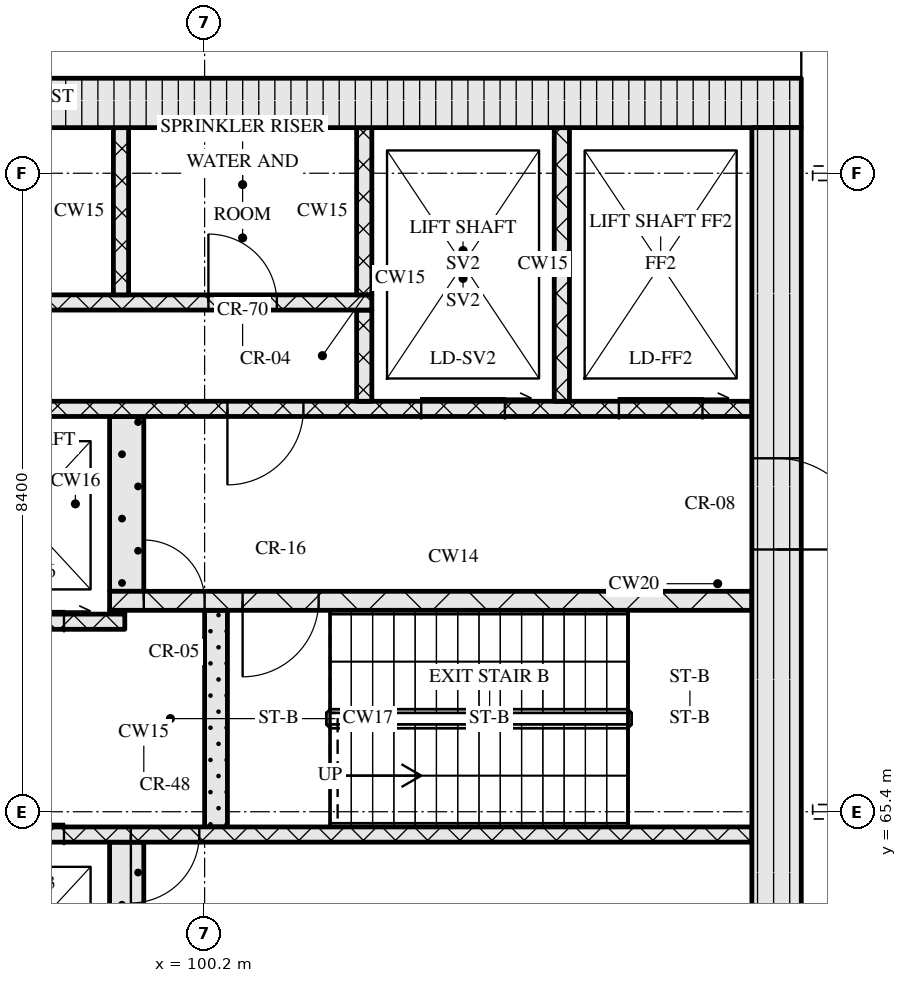
"""IFC4 building model, lengths in metres.
Left out: names, types, materials, properties, quantities, classifications, styles, units other than length and angle.
Written with IfcOpenShell. Run it as: python <this file> out.ifc"""

import sys

from ifc_helpers import new_model, si_unit, direction, frame, frame_2d, origin, place, context, subcontext, project, spatial, rectangle, extrude, element, fill, save


model = new_model("IFC4")
c1 = context("Model", 3, precision=1e-05, world=origin(), true_north=direction((0.0, 1.0)))
c2 = subcontext(c1, "Body", "Model", "MODEL_VIEW")
j1 = project(units=[si_unit("LENGTHUNIT", "METRE"), si_unit("PLANEANGLEUNIT", "RADIAN")], contexts=[c1])
p1 = place(None, origin())
s1 = spatial("IfcSite", under=j1, at=p1, CompositionType="ELEMENT")
p2 = place(p1, origin())
s2 = spatial("IfcBuilding", under=s1, at=p2, CompositionType="ELEMENT")
p3 = place(p2, frame((0.0, 0.0, 194.25)))
s3 = spatial("IfcBuildingStorey", under=s2, at=p3, CompositionType="ELEMENT", Elevation=194.25)
p4 = place(p3, frame((67.15, 74.725, 0.0), z_axis=(0.0, 0.0, 1.0), x_axis=(1.0, 0.0, 0.0)))
e1 = element("IfcWall", 1, at=p4, inside=s3, PredefinedType="SOLIDWALL", context=c2, shape_type="SweptSolid", body=[
    extrude(rectangle(XDim=40.9, YDim=0.65, at=frame_2d((20.45, 0.0))), origin(), (0.0, 0.0, 1.0), 10.97),
])
p5 = place(p3, frame((107.725, 62.4, 0.0), z_axis=(0.0, 0.0, 1.0), x_axis=(0.0, 1.0, 0.0)))
e2 = element("IfcWall", 2, at=p5, inside=s3, PredefinedType="SOLIDWALL", context=c2, shape_type="SweptSolid", body=[
    extrude(rectangle(XDim=12.0, YDim=0.65, at=frame_2d((6.0, 0.0))), origin(), (0.0, 0.0, 1.0), 10.97),
])
p6 = place(p5, frame((6.45, 0.0, 0.0)))
e3 = element("IfcOpeningElement", 3, at=p6, cuts=e2, PredefinedType="OPENING", context=c2, shape_type="SweptSolid", body=[
    extrude(rectangle(XDim=1.2, YDim=2.1, at=frame_2d((0.6, 1.05))), frame((0.0, 0.335, 0.0), z_axis=(0.0, -1.0, 0.0), x_axis=(1.0, 0.0, 0.0)), (0.0, 0.0, 1.0), 0.67),
])
p7 = place(p3, frame((99.175, 62.4, 0.0), z_axis=(0.0, 0.0, 1.0), x_axis=(0.0, 1.0, 0.0)))
e4 = element("IfcWall", 4, at=p7, inside=s3, PredefinedType="SOLIDWALL", context=c2, shape_type="SweptSolid", body=[
    extrude(rectangle(XDim=2.6, YDim=0.45, at=frame_2d((1.3, 0.0))), origin(), (0.0, 0.0, 1.0), 10.97),
])
p8 = place(p3, frame((91.4, 65.1, 0.0), z_axis=(0.0, 0.0, 1.0), x_axis=(1.0, 0.0, 0.0)))
e5 = element("IfcWall", 5, at=p8, inside=s3, PredefinedType="SOLIDWALL", context=c2, shape_type="SweptSolid", body=[
    extrude(rectangle(XDim=16.0, YDim=0.2, at=frame_2d((8.0, 0.0))), origin(), (0.0, 0.0, 1.0), 10.97),
])
p9 = place(p8, frame((0.85, 0.0, 0.0)))
e6 = element("IfcOpeningElement", 6, at=p9, cuts=e5, PredefinedType="OPENING", context=c2, shape_type="SweptSolid", body=[
    extrude(rectangle(XDim=1.1, YDim=2.1, at=frame_2d((0.55, 1.05))), frame((0.0, 0.11, 0.0), z_axis=(0.0, -1.0, 0.0), x_axis=(1.0, 0.0, 0.0)), (0.0, 0.0, 1.0), 0.22),
])
p10 = place(p8, frame((3.35, 0.0, 0.0)))
e7 = element("IfcOpeningElement", 7, at=p10, cuts=e5, PredefinedType="OPENING", context=c2, shape_type="SweptSolid", body=[
    extrude(rectangle(XDim=1.1, YDim=2.1, at=frame_2d((0.55, 1.05))), frame((0.0, 0.11, 0.0), z_axis=(0.0, -1.0, 0.0), x_axis=(1.0, 0.0, 0.0)), (0.0, 0.0, 1.0), 0.22),
])
p11 = place(p8, frame((5.85, 0.0, 0.0)))
e8 = element("IfcOpeningElement", 8, at=p11, cuts=e5, PredefinedType="OPENING", context=c2, shape_type="SweptSolid", body=[
    extrude(rectangle(XDim=1.1, YDim=2.1, at=frame_2d((0.55, 1.05))), frame((0.0, 0.11, 0.0), z_axis=(0.0, -1.0, 0.0), x_axis=(1.0, 0.0, 0.0)), (0.0, 0.0, 1.0), 0.22),
])
p12 = place(p8, frame((7.83, 0.0, 0.0)))
e9 = element("IfcOpeningElement", 9, at=p12, cuts=e5, PredefinedType="OPENING", context=c2, shape_type="SweptSolid", body=[
    extrude(rectangle(XDim=0.9, YDim=2.1, at=frame_2d((0.45, 1.05))), frame((0.0, 0.11, 0.0), z_axis=(0.0, -1.0, 0.0), x_axis=(1.0, 0.0, 0.0)), (0.0, 0.0, 1.0), 0.22),
])
p13 = place(p3, frame((100.35, 65.2, 0.0), z_axis=(0.0, 0.0, 1.0), x_axis=(0.0, 1.0, 0.0)))
e10 = element("IfcWall", 10, at=p13, inside=s3, PredefinedType="SOLIDWALL", context=c2, shape_type="SweptSolid", body=[
    extrude(rectangle(XDim=2.85, YDim=0.3, at=frame_2d((1.425, 0.0))), origin(), (0.0, 0.0, 1.0), 10.97),
])
p14 = place(p3, frame((76.05, 67.9, 0.0), z_axis=(0.0, 0.0, 1.0), x_axis=(1.0, 0.0, 0.0)))
e11 = element("IfcWall", 11, at=p14, inside=s3, PredefinedType="SOLIDWALL", context=c2, shape_type="SweptSolid", body=[
    extrude(rectangle(XDim=23.1, YDim=0.2, at=frame_2d((11.55, 0.0))), origin(), (0.0, 0.0, 1.0), 10.97),
])
p15 = place(p14, frame((0.75, 0.0, 0.0)))
e12 = element("IfcOpeningElement", 12, at=p15, cuts=e11, PredefinedType="OPENING", context=c2, shape_type="SweptSolid", body=[
    extrude(rectangle(XDim=0.9, YDim=2.1, at=frame_2d((0.45, 1.05))), frame((0.0, 0.11, 0.0), z_axis=(0.0, -1.0, 0.0), x_axis=(1.0, 0.0, 0.0)), (0.0, 0.0, 1.0), 0.22),
])
p16 = place(p14, frame((3.32, 0.0, 0.0)))
e13 = element("IfcOpeningElement", 13, at=p16, cuts=e11, PredefinedType="OPENING", context=c2, shape_type="SweptSolid", body=[
    extrude(rectangle(XDim=0.9, YDim=2.1, at=frame_2d((0.45, 1.05))), frame((0.0, 0.11, 0.0), z_axis=(0.0, -1.0, 0.0), x_axis=(1.0, 0.0, 0.0)), (0.0, 0.0, 1.0), 0.22),
])
p17 = place(p14, frame((5.77, 0.0, 0.0)))
e14 = element("IfcOpeningElement", 14, at=p17, cuts=e11, PredefinedType="OPENING", context=c2, shape_type="SweptSolid", body=[
    extrude(rectangle(XDim=0.9, YDim=2.1, at=frame_2d((0.45, 1.05))), frame((0.0, 0.11, 0.0), z_axis=(0.0, -1.0, 0.0), x_axis=(1.0, 0.0, 0.0)), (0.0, 0.0, 1.0), 0.22),
])
p18 = place(p14, frame((8.45, 0.0, 0.0)))
e15 = element("IfcOpeningElement", 15, at=p18, cuts=e11, PredefinedType="OPENING", context=c2, shape_type="SweptSolid", body=[
    extrude(rectangle(XDim=0.9, YDim=2.1, at=frame_2d((0.45, 1.05))), frame((0.0, 0.11, 0.0), z_axis=(0.0, -1.0, 0.0), x_axis=(1.0, 0.0, 0.0)), (0.0, 0.0, 1.0), 0.22),
])
p19 = place(p14, frame((10.91, 0.0, 0.0)))
e16 = element("IfcOpeningElement", 16, at=p19, cuts=e11, PredefinedType="OPENING", context=c2, shape_type="SweptSolid", body=[
    extrude(rectangle(XDim=0.9, YDim=2.1, at=frame_2d((0.45, 1.05))), frame((0.0, 0.11, 0.0), z_axis=(0.0, -1.0, 0.0), x_axis=(1.0, 0.0, 0.0)), (0.0, 0.0, 1.0), 0.22),
])
p20 = place(p14, frame((13.55, 0.0, 0.0)))
e17 = element("IfcOpeningElement", 17, at=p20, cuts=e11, PredefinedType="OPENING", context=c2, shape_type="SweptSolid", body=[
    extrude(rectangle(XDim=1.0, YDim=2.1, at=frame_2d((0.5, 1.05))), frame((0.0, 0.11, 0.0), z_axis=(0.0, -1.0, 0.0), x_axis=(1.0, 0.0, 0.0)), (0.0, 0.0, 1.0), 0.22),
])
p21 = place(p14, frame((16.2, 0.0, 0.0)))
e18 = element("IfcOpeningElement", 18, at=p21, cuts=e11, PredefinedType="OPENING", context=c2, shape_type="SweptSolid", body=[
    extrude(rectangle(XDim=1.1, YDim=2.1, at=frame_2d((0.55, 1.05))), frame((0.0, 0.11, 0.0), z_axis=(0.0, -1.0, 0.0), x_axis=(1.0, 0.0, 0.0)), (0.0, 0.0, 1.0), 0.22),
])
p22 = place(p14, frame((18.7, 0.0, 0.0)))
e19 = element("IfcOpeningElement", 19, at=p22, cuts=e11, PredefinedType="OPENING", context=c2, shape_type="SweptSolid", body=[
    extrude(rectangle(XDim=1.1, YDim=2.1, at=frame_2d((0.55, 1.05))), frame((0.0, 0.11, 0.0), z_axis=(0.0, -1.0, 0.0), x_axis=(1.0, 0.0, 0.0)), (0.0, 0.0, 1.0), 0.22),
])
p23 = place(p14, frame((21.2, 0.0, 0.0)))
e20 = element("IfcOpeningElement", 20, at=p23, cuts=e11, PredefinedType="OPENING", context=c2, shape_type="SweptSolid", body=[
    extrude(rectangle(XDim=1.1, YDim=2.1, at=frame_2d((0.55, 1.05))), frame((0.0, 0.11, 0.0), z_axis=(0.0, -1.0, 0.0), x_axis=(1.0, 0.0, 0.0)), (0.0, 0.0, 1.0), 0.22),
])
p24 = place(p3, frame((98.95, 68.025, 0.0), z_axis=(0.0, 0.0, 1.0), x_axis=(1.0, 0.0, 0.0)))
e21 = element("IfcWall", 21, at=p24, inside=s3, PredefinedType="SOLIDWALL", context=c2, shape_type="SweptSolid", body=[
    extrude(rectangle(XDim=0.2, YDim=0.05, at=frame_2d((0.1, 0.0))), origin(), (0.0, 0.0, 1.0), 10.97),
])
p25 = place(p3, frame((98.95, 68.175, 0.0), z_axis=(0.0, 0.0, 1.0), x_axis=(1.0, 0.0, 0.0)))
e22 = element("IfcWall", 22, at=p25, inside=s3, PredefinedType="SOLIDWALL", context=c2, shape_type="SweptSolid", body=[
    extrude(rectangle(XDim=8.45, YDim=0.25, at=frame_2d((4.225, 0.0))), origin(), (0.0, 0.0, 1.0), 10.97),
])
p26 = place(p25, frame((0.45, 0.0, 0.0)))
e23 = element("IfcOpeningElement", 23, at=p26, cuts=e22, PredefinedType="OPENING", context=c2, shape_type="SweptSolid", body=[
    extrude(rectangle(XDim=0.8, YDim=2.1, at=frame_2d((0.4, 1.05))), frame((0.0, 0.135, 0.0), z_axis=(0.0, -1.0, 0.0), x_axis=(1.0, 0.0, 0.0)), (0.0, 0.0, 1.0), 0.27),
])
p27 = place(p25, frame((1.75, 0.0, 0.0)))
e24 = element("IfcOpeningElement", 24, at=p27, cuts=e22, PredefinedType="OPENING", context=c2, shape_type="SweptSolid", body=[
    extrude(rectangle(XDim=1.0, YDim=2.1, at=frame_2d((0.5, 1.05))), frame((0.0, 0.135, 0.0), z_axis=(0.0, -1.0, 0.0), x_axis=(1.0, 0.0, 0.0)), (0.0, 0.0, 1.0), 0.27),
])
p28 = place(p3, frame((99.175, 68.3, 0.0), z_axis=(0.0, 0.0, 1.0), x_axis=(0.0, 1.0, 0.0)))
e25 = element("IfcWall", 25, at=p28, inside=s3, PredefinedType="SOLIDWALL", context=c2, shape_type="SweptSolid", body=[
    extrude(rectangle(XDim=2.3, YDim=0.45, at=frame_2d((1.15, 0.0))), origin(), (0.0, 0.0, 1.0), 10.97),
])
p29 = place(p3, frame((67.8, 70.7, 0.0), z_axis=(0.0, 0.0, 1.0), x_axis=(1.0, 0.0, 0.0)))
e26 = element("IfcWall", 26, at=p29, inside=s3, PredefinedType="SOLIDWALL", context=c2, shape_type="SweptSolid", body=[
    extrude(rectangle(XDim=39.6, YDim=0.2, at=frame_2d((19.8, 0.0))), origin(), (0.0, 0.0, 1.0), 10.97),
])
p30 = place(p29, frame((0.65, 0.0, 0.0)))
e27 = element("IfcOpeningElement", 27, at=p30, cuts=e26, PredefinedType="OPENING", context=c2, shape_type="SweptSolid", body=[
    extrude(rectangle(XDim=1.1, YDim=2.1, at=frame_2d((0.55, 1.05))), frame((0.0, 0.11, 0.0), z_axis=(0.0, -1.0, 0.0), x_axis=(1.0, 0.0, 0.0)), (0.0, 0.0, 1.0), 0.22),
])
p31 = place(p29, frame((3.25, 0.0, 0.0)))
e28 = element("IfcOpeningElement", 28, at=p31, cuts=e26, PredefinedType="OPENING", context=c2, shape_type="SweptSolid", body=[
    extrude(rectangle(XDim=1.1, YDim=2.1, at=frame_2d((0.55, 1.05))), frame((0.0, 0.11, 0.0), z_axis=(0.0, -1.0, 0.0), x_axis=(1.0, 0.0, 0.0)), (0.0, 0.0, 1.0), 0.22),
])
p32 = place(p29, frame((5.9, 0.0, 0.0)))
e29 = element("IfcOpeningElement", 29, at=p32, cuts=e26, PredefinedType="OPENING", context=c2, shape_type="SweptSolid", body=[
    extrude(rectangle(XDim=1.0, YDim=2.1, at=frame_2d((0.5, 1.05))), frame((0.0, 0.11, 0.0), z_axis=(0.0, -1.0, 0.0), x_axis=(1.0, 0.0, 0.0)), (0.0, 0.0, 1.0), 0.22),
])
p33 = place(p29, frame((21.7, 0.0, 0.0)))
e30 = element("IfcOpeningElement", 30, at=p33, cuts=e26, PredefinedType="OPENING", context=c2, shape_type="SweptSolid", body=[
    extrude(rectangle(XDim=1.0, YDim=2.1, at=frame_2d((0.5, 1.05))), frame((0.0, 0.11, 0.0), z_axis=(0.0, -1.0, 0.0), x_axis=(1.0, 0.0, 0.0)), (0.0, 0.0, 1.0), 0.22),
])
p34 = place(p29, frame((32.7, 0.0, 0.0)))
e31 = element("IfcOpeningElement", 31, at=p34, cuts=e26, PredefinedType="OPENING", context=c2, shape_type="SweptSolid", body=[
    extrude(rectangle(XDim=1.0, YDim=2.1, at=frame_2d((0.5, 1.05))), frame((0.0, 0.11, 0.0), z_axis=(0.0, -1.0, 0.0), x_axis=(1.0, 0.0, 0.0)), (0.0, 0.0, 1.0), 0.22),
])
p35 = place(p29, frame((35.25, 0.0, 0.0)))
e32 = element("IfcOpeningElement", 32, at=p35, cuts=e26, PredefinedType="OPENING", context=c2, shape_type="SweptSolid", body=[
    extrude(rectangle(XDim=1.1, YDim=2.1, at=frame_2d((0.55, 1.05))), frame((0.0, 0.11, 0.0), z_axis=(0.0, -1.0, 0.0), x_axis=(1.0, 0.0, 0.0)), (0.0, 0.0, 1.0), 0.22),
])
p36 = place(p29, frame((37.85, 0.0, 0.0)))
e33 = element("IfcOpeningElement", 33, at=p36, cuts=e26, PredefinedType="OPENING", context=c2, shape_type="SweptSolid", body=[
    extrude(rectangle(XDim=1.1, YDim=2.1, at=frame_2d((0.55, 1.05))), frame((0.0, 0.11, 0.0), z_axis=(0.0, -1.0, 0.0), x_axis=(1.0, 0.0, 0.0)), (0.0, 0.0, 1.0), 0.22),
])
p37 = place(p3, frame((102.3, 70.8, 0.0), z_axis=(0.0, 0.0, 1.0), x_axis=(0.0, 1.0, 0.0)))
e34 = element("IfcWall", 34, at=p37, inside=s3, PredefinedType="SOLIDWALL", context=c2, shape_type="SweptSolid", body=[
    extrude(rectangle(XDim=1.2, YDim=0.2, at=frame_2d((0.6, 0.0))), origin(), (0.0, 0.0, 1.0), 10.97),
])
p38 = place(p3, frame((104.9, 70.8, 0.0), z_axis=(0.0, 0.0, 1.0), x_axis=(0.0, 1.0, 0.0)))
e35 = element("IfcWall", 35, at=p38, inside=s3, PredefinedType="SOLIDWALL", context=c2, shape_type="SweptSolid", body=[
    extrude(rectangle(XDim=3.6, YDim=0.2, at=frame_2d((1.8, 0.0))), origin(), (0.0, 0.0, 1.0), 10.97),
])
p39 = place(p3, frame((90.7, 72.1, 0.0), z_axis=(0.0, 0.0, 1.0), x_axis=(1.0, 0.0, 0.0)))
e36 = element("IfcWall", 36, at=p39, inside=s3, PredefinedType="SOLIDWALL", context=c2, shape_type="SweptSolid", body=[
    extrude(rectangle(XDim=11.7, YDim=0.2, at=frame_2d((5.85, 0.0))), origin(), (0.0, 0.0, 1.0), 10.97),
])
p40 = place(p39, frame((4.025, 0.0, 0.0)))
e37 = element("IfcOpeningElement", 37, at=p40, cuts=e36, PredefinedType="OPENING", context=c2, shape_type="SweptSolid", body=[
    extrude(rectangle(XDim=1.2, YDim=2.1, at=frame_2d((0.6, 1.05))), frame((0.0, 0.11, 0.0), z_axis=(0.0, -1.0, 0.0), x_axis=(1.0, 0.0, 0.0)), (0.0, 0.0, 1.0), 0.22),
])
p41 = place(p39, frame((9.55, 0.0, 0.0)))
e38 = element("IfcOpeningElement", 38, at=p41, cuts=e36, PredefinedType="OPENING", context=c2, shape_type="SweptSolid", body=[
    extrude(rectangle(XDim=0.9, YDim=2.1, at=frame_2d((0.45, 1.05))), frame((0.0, 0.11, 0.0), z_axis=(0.0, -1.0, 0.0), x_axis=(1.0, 0.0, 0.0)), (0.0, 0.0, 1.0), 0.22),
])
for number, where, z_axis, x_axis in (
    (39, (99.1, 72.2, 0.0), (0.0, 0.0, 1.0), (0.0, 1.0, 0.0)),
    (40, (102.3, 72.2, 0.0), (0.0, 0.0, 1.0), (0.0, 1.0, 0.0)),
):
    element("IfcWall", number, at=place(p3, frame(where, z_axis=z_axis, x_axis=x_axis)), inside=s3, PredefinedType="SOLIDWALL", context=c2, shape_type="SweptSolid", body=[
        extrude(rectangle(XDim=2.2, YDim=0.2, at=frame_2d((1.1, 0.0))), origin(), (0.0, 0.0, 1.0), 10.97),
    ])
p42 = place(p11, origin())
e41 = element("IfcDoor", 41, at=p42, inside=s3, OperationType="SLIDING_TO_LEFT", PredefinedType="DOOR", context=c2, shape_type="SweptSolid", body=[
    extrude(rectangle(XDim=1.1, YDim=2.1, at=frame_2d((0.55, 1.05))), frame((0.0, 0.025, 0.0), z_axis=(0.0, -1.0, 0.0), x_axis=(1.0, 0.0, 0.0)), (0.0, 0.0, 1.0), 0.05),
])
fill(e8, e41)
p43 = place(p12, origin())
e42 = element("IfcDoor", 42, at=p43, inside=s3, OperationType="SINGLE_SWING_RIGHT", PredefinedType="DOOR", context=c2, shape_type="SweptSolid", body=[
    extrude(rectangle(XDim=0.9, YDim=2.1, at=frame_2d((0.45, 1.05))), frame((0.0, 0.025, 0.0), z_axis=(0.0, -1.0, 0.0), x_axis=(1.0, 0.0, 0.0)), (0.0, 0.0, 1.0), 0.05),
])
fill(e9, e42)
p44 = place(p23, origin())
e43 = element("IfcDoor", 43, at=p44, inside=s3, OperationType="SLIDING_TO_RIGHT", PredefinedType="DOOR", context=c2, shape_type="SweptSolid", body=[
    extrude(rectangle(XDim=1.1, YDim=2.1, at=frame_2d((0.55, 1.05))), frame((0.0, 0.025, 0.0), z_axis=(0.0, -1.0, 0.0), x_axis=(1.0, 0.0, 0.0)), (0.0, 0.0, 1.0), 0.05),
])
fill(e20, e43)
p45 = place(p26, origin())
e44 = element("IfcDoor", 44, at=p45, inside=s3, OperationType="SINGLE_SWING_LEFT", PredefinedType="DOOR", context=c2, shape_type="SweptSolid", body=[
    extrude(rectangle(XDim=0.8, YDim=2.1, at=frame_2d((0.4, 1.05))), frame((0.0, 0.025, 0.0), z_axis=(0.0, -1.0, 0.0), x_axis=(1.0, 0.0, 0.0)), (0.0, 0.0, 1.0), 0.05),
])
fill(e23, e44)
p46 = place(p27, origin())
e45 = element("IfcDoor", 45, at=p46, inside=s3, OperationType="SINGLE_SWING_RIGHT", PredefinedType="DOOR", context=c2, shape_type="SweptSolid", body=[
    extrude(rectangle(XDim=1.0, YDim=2.1, at=frame_2d((0.5, 1.05))), frame((0.0, 0.025, 0.0), z_axis=(0.0, -1.0, 0.0), x_axis=(1.0, 0.0, 0.0)), (0.0, 0.0, 1.0), 0.05),
])
fill(e24, e45)
p47 = place(p6, origin())
e46 = element("IfcDoor", 46, at=p47, inside=s3, OperationType="SINGLE_SWING_RIGHT", PredefinedType="DOOR", context=c2, shape_type="SweptSolid", body=[
    extrude(rectangle(XDim=1.2, YDim=2.1, at=frame_2d((0.6, 1.05))), frame((0.0, 0.025, 0.0), z_axis=(0.0, -1.0, 0.0), x_axis=(1.0, 0.0, 0.0)), (0.0, 0.0, 1.0), 0.05),
])
fill(e3, e46)
p48 = place(p34, origin())
e47 = element("IfcDoor", 47, at=p48, inside=s3, OperationType="SINGLE_SWING_RIGHT", PredefinedType="DOOR", context=c2, shape_type="SweptSolid", body=[
    extrude(rectangle(XDim=1.0, YDim=2.1, at=frame_2d((0.5, 1.05))), frame((0.0, 0.025, 0.0), z_axis=(0.0, -1.0, 0.0), x_axis=(1.0, 0.0, 0.0)), (0.0, 0.0, 1.0), 0.05),
])
fill(e31, e47)
p49 = place(p35, origin())
e48 = element("IfcDoor", 48, at=p49, inside=s3, OperationType="SLIDING_TO_RIGHT", PredefinedType="DOOR", context=c2, shape_type="SweptSolid", body=[
    extrude(rectangle(XDim=1.1, YDim=2.1, at=frame_2d((0.55, 1.05))), frame((0.0, 0.025, 0.0), z_axis=(0.0, -1.0, 0.0), x_axis=(1.0, 0.0, 0.0)), (0.0, 0.0, 1.0), 0.05),
])
fill(e32, e48)
p50 = place(p36, origin())
e49 = element("IfcDoor", 49, at=p50, inside=s3, OperationType="SLIDING_TO_RIGHT", PredefinedType="DOOR", context=c2, shape_type="SweptSolid", body=[
    extrude(rectangle(XDim=1.1, YDim=2.1, at=frame_2d((0.55, 1.05))), frame((0.0, 0.025, 0.0), z_axis=(0.0, -1.0, 0.0), x_axis=(1.0, 0.0, 0.0)), (0.0, 0.0, 1.0), 0.05),
])
fill(e33, e49)
p51 = place(p41, origin())
e50 = element("IfcDoor", 50, at=p51, inside=s3, OperationType="SINGLE_SWING_LEFT", PredefinedType="DOOR", context=c2, shape_type="SweptSolid", body=[
    extrude(rectangle(XDim=0.9, YDim=2.1, at=frame_2d((0.45, 1.05))), frame((0.0, 0.025, 0.0), z_axis=(0.0, -1.0, 0.0), x_axis=(1.0, 0.0, 0.0)), (0.0, 0.0, 1.0), 0.05),
])
fill(e38, e50)
save(model, sys.argv[1])
